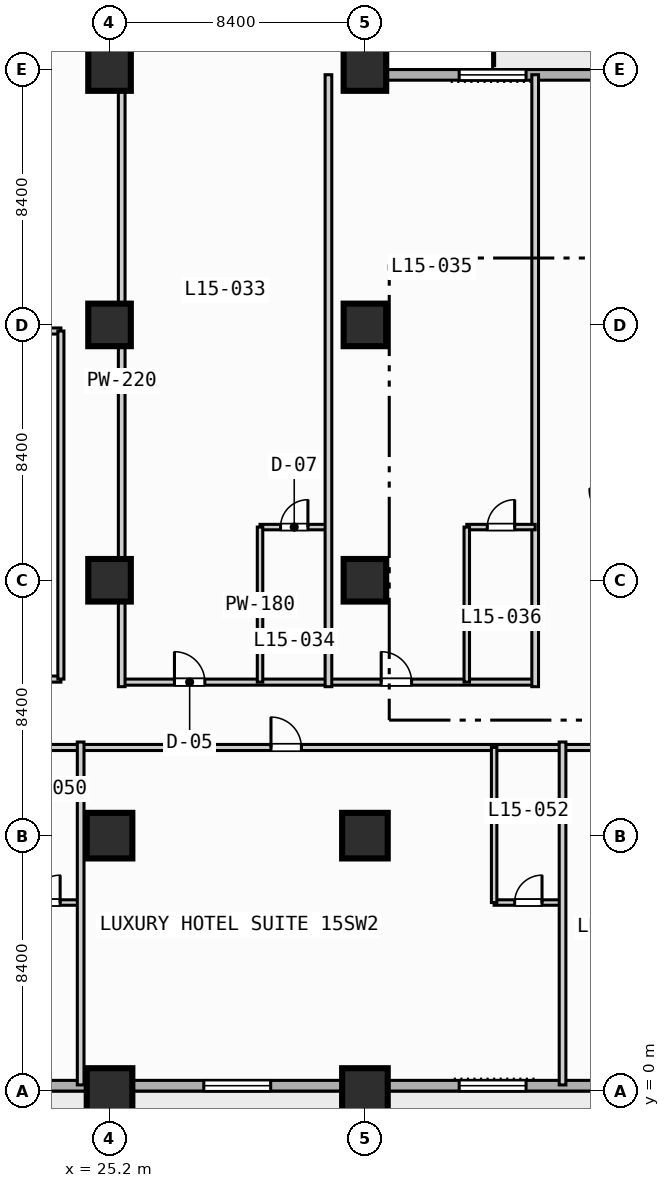
"""IFC4 building model, lengths in metres.
Left out: names, types, materials, properties, quantities, classifications, styles, units other than length and angle.
Written with IfcOpenShell. Run it as: python <this file> out.ifc"""

import sys

from ifc_helpers import new_model, si_unit, direction, frame, frame_2d, origin, origin_2d, place, context, subcontext, project, spatial, rectangle, extrude, element, fill, save


model = new_model("IFC4")
c1 = context("Model", 3, precision=1e-05, world=origin(), true_north=direction((0.0, 1.0)))
c2 = subcontext(c1, "Body", "Model", "MODEL_VIEW")
j1 = project(units=[si_unit("LENGTHUNIT", "METRE"), si_unit("PLANEANGLEUNIT", "RADIAN")], contexts=[c1])
p1 = place(None, origin())
s1 = spatial("IfcSite", under=j1, at=p1, CompositionType="ELEMENT")
p2 = place(p1, origin())
s2 = spatial("IfcBuilding", under=s1, at=p2, CompositionType="ELEMENT")
p3 = place(p2, frame((0.0, 0.0, 66.2)))
s3 = spatial("IfcBuildingStorey", under=s2, at=p3, CompositionType="ELEMENT", Elevation=66.2)
for number, where, z_axis, x_axis in (
    (1, (25.2, 0.0, 0.0), (0.0, 0.0, 1.0), (1.0, 0.0, 0.0)),
    (2, (25.2, 8.4, 0.0), (0.0, 0.0, 1.0), (1.0, 0.0, 0.0)),
):
    element("IfcColumn", number, at=place(p3, frame(where, z_axis=z_axis, x_axis=x_axis)), inside=s3, PredefinedType="COLUMN", context=c2, shape_type="SweptSolid", body=[
        extrude(rectangle(XDim=1.5, YDim=1.5, at=origin_2d()), origin(), (0.0, 0.0, 1.0), 3.8),
    ])
for number, where, z_axis, x_axis in (
    (3, (25.2, 16.8, 0.0), (0.0, 0.0, 1.0), (1.0, 0.0, 0.0)),
    (4, (25.2, 25.2, 0.0), (0.0, 0.0, 1.0), (1.0, 0.0, 0.0)),
    (5, (25.2, 33.6, 0.0), (0.0, 0.0, 1.0), (1.0, 0.0, 0.0)),
):
    element("IfcColumn", number, at=place(p3, frame(where, z_axis=z_axis, x_axis=x_axis)), inside=s3, PredefinedType="COLUMN", context=c2, shape_type="SweptSolid", body=[
        extrude(rectangle(XDim=1.4, YDim=1.4, at=origin_2d()), origin(), (0.0, 0.0, 1.0), 3.8),
    ])
for number, where, z_axis, x_axis in (
    (6, (33.6, 0.0, 0.0), (0.0, 0.0, 1.0), (1.0, 0.0, 0.0)),
    (7, (33.6, 8.4, 0.0), (0.0, 0.0, 1.0), (1.0, 0.0, 0.0)),
):
    element("IfcColumn", number, at=place(p3, frame(where, z_axis=z_axis, x_axis=x_axis)), inside=s3, PredefinedType="COLUMN", context=c2, shape_type="SweptSolid", body=[
        extrude(rectangle(XDim=1.5, YDim=1.5, at=origin_2d()), origin(), (0.0, 0.0, 1.0), 3.8),
    ])
for number, where, z_axis, x_axis in (
    (8, (33.6, 16.8, 0.0), (0.0, 0.0, 1.0), (1.0, 0.0, 0.0)),
    (9, (33.6, 25.2, 0.0), (0.0, 0.0, 1.0), (1.0, 0.0, 0.0)),
    (10, (33.6, 33.6, 0.0), (0.0, 0.0, 1.0), (1.0, 0.0, 0.0)),
):
    element("IfcColumn", number, at=place(p3, frame(where, z_axis=z_axis, x_axis=x_axis)), inside=s3, PredefinedType="COLUMN", context=c2, shape_type="SweptSolid", body=[
        extrude(rectangle(XDim=1.4, YDim=1.4, at=origin_2d()), origin(), (0.0, 0.0, 1.0), 3.8),
    ])
p4 = place(p3, frame((33.425, 89.225, 0.0), z_axis=(0.0, 0.0, 1.0), x_axis=(0.0, -1.0, 0.0)))
e11 = element("IfcWall", 11, at=p4, inside=s3, PredefinedType="STANDARD", context=c2, shape_type="SweptSolid", body=[
    extrude(rectangle(XDim=55.8, YDim=0.35, at=frame_2d((27.9, 0.0))), origin(), (0.0, 0.0, 1.0), 3.55),
])
p5 = place(p4, frame((16.725, 0.0, 0.85)))
e12 = element("IfcOpeningElement", 12, at=p5, cuts=e11, PredefinedType="OPENING", context=c2, shape_type="SweptSolid", body=[
    extrude(rectangle(XDim=2.2, YDim=1.8, at=frame_2d((1.1, 0.9))), frame((0.0, 0.185, 0.0), z_axis=(0.0, -1.0, 0.0), x_axis=(1.0, 0.0, 0.0)), (0.0, 0.0, 1.0), 0.37),
])
p6 = place(p4, frame((8.325, 0.0, 0.85)))
e13 = element("IfcOpeningElement", 13, at=p6, cuts=e11, PredefinedType="OPENING", context=c2, shape_type="SweptSolid", body=[
    extrude(rectangle(XDim=2.2, YDim=1.8, at=frame_2d((1.1, 0.9))), frame((0.0, 0.185, 0.0), z_axis=(0.0, -1.0, 0.0), x_axis=(1.0, 0.0, 0.0)), (0.0, 0.0, 1.0), 0.37),
])
p7 = place(p3, frame((33.425, 33.425, 0.0), z_axis=(0.0, 0.0, 1.0), x_axis=(1.0, 0.0, 0.0)))
e14 = element("IfcWall", 14, at=p7, inside=s3, PredefinedType="STANDARD", context=c2, shape_type="SweptSolid", body=[
    extrude(rectangle(XDim=55.8, YDim=0.35, at=frame_2d((27.9, 0.0))), origin(), (0.0, 0.0, 1.0), 3.55),
])
p8 = place(p7, frame((12.075, 0.0, 0.0)))
e15 = element("IfcOpeningElement", 15, at=p8, cuts=e14, PredefinedType="OPENING", context=c2, shape_type="SweptSolid", body=[
    extrude(rectangle(XDim=1.4, YDim=2.2, at=frame_2d((0.7, 1.1))), frame((0.0, 0.185, 0.0), z_axis=(0.0, -1.0, 0.0), x_axis=(1.0, 0.0, 0.0)), (0.0, 0.0, 1.0), 0.37),
])
p9 = place(p7, frame((3.275, 0.0, 0.85)))
e16 = element("IfcOpeningElement", 16, at=p9, cuts=e14, PredefinedType="OPENING", context=c2, shape_type="SweptSolid", body=[
    extrude(rectangle(XDim=2.2, YDim=1.8, at=frame_2d((1.1, 0.9))), frame((0.0, 0.185, 0.0), z_axis=(0.0, -1.0, 0.0), x_axis=(1.0, 0.0, 0.0)), (0.0, 0.0, 1.0), 0.37),
])
p10 = place(p7, frame((36.875, 0.0, 0.85)))
e17 = element("IfcOpeningElement", 17, at=p10, cuts=e14, PredefinedType="OPENING", context=c2, shape_type="SweptSolid", body=[
    extrude(rectangle(XDim=2.2, YDim=1.8, at=frame_2d((1.1, 0.9))), frame((0.0, 0.185, 0.0), z_axis=(0.0, -1.0, 0.0), x_axis=(1.0, 0.0, 0.0)), (0.0, 0.0, 1.0), 0.37),
])
p11 = place(p7, frame((45.275, 0.0, 0.85)))
e18 = element("IfcOpeningElement", 18, at=p11, cuts=e14, PredefinedType="OPENING", context=c2, shape_type="SweptSolid", body=[
    extrude(rectangle(XDim=2.2, YDim=1.8, at=frame_2d((1.1, 0.9))), frame((0.0, 0.185, 0.0), z_axis=(0.0, -1.0, 0.0), x_axis=(1.0, 0.0, 0.0)), (0.0, 0.0, 1.0), 0.37),
])
p12 = place(p3, frame((89.225, 0.175, 0.0), z_axis=(0.0, 0.0, 1.0), x_axis=(-1.0, 0.0, 0.0)))
e19 = element("IfcWall", 19, at=p12, inside=s3, PredefinedType="STANDARD", context=c2, shape_type="SweptSolid", body=[
    extrude(rectangle(XDim=86.05, YDim=0.35, at=frame_2d((43.025, 0.0))), origin(), (0.0, 0.0, 1.0), 3.55),
])
p13 = place(p12, frame((67.525, 0.0, 0.0)))
e20 = element("IfcOpeningElement", 20, at=p13, cuts=e19, PredefinedType="OPENING", context=c2, shape_type="SweptSolid", body=[
    extrude(rectangle(XDim=1.4, YDim=2.2, at=frame_2d((0.7, 1.1))), frame((0.0, 0.185, 0.0), z_axis=(0.0, -1.0, 0.0), x_axis=(1.0, 0.0, 0.0)), (0.0, 0.0, 1.0), 0.37),
])
p14 = place(p12, frame((58.725, 0.0, 0.85)))
e21 = element("IfcOpeningElement", 21, at=p14, cuts=e19, PredefinedType="OPENING", context=c2, shape_type="SweptSolid", body=[
    extrude(rectangle(XDim=2.2, YDim=1.8, at=frame_2d((1.1, 0.9))), frame((0.0, 0.185, 0.0), z_axis=(0.0, -1.0, 0.0), x_axis=(1.0, 0.0, 0.0)), (0.0, 0.0, 1.0), 0.37),
])
p15 = place(p12, frame((50.325, 0.0, 0.85)))
e22 = element("IfcOpeningElement", 22, at=p15, cuts=e19, PredefinedType="OPENING", context=c2, shape_type="SweptSolid", body=[
    extrude(rectangle(XDim=2.2, YDim=1.8, at=frame_2d((1.1, 0.9))), frame((0.0, 0.185, 0.0), z_axis=(0.0, -1.0, 0.0), x_axis=(1.0, 0.0, 0.0)), (0.0, 0.0, 1.0), 0.37),
])
p16 = place(p12, frame((41.925, 0.0, 0.85)))
e23 = element("IfcOpeningElement", 23, at=p16, cuts=e19, PredefinedType="OPENING", context=c2, shape_type="SweptSolid", body=[
    extrude(rectangle(XDim=2.2, YDim=1.8, at=frame_2d((1.1, 0.9))), frame((0.0, 0.185, 0.0), z_axis=(0.0, -1.0, 0.0), x_axis=(1.0, 0.0, 0.0)), (0.0, 0.0, 1.0), 0.37),
])
p17 = place(p12, frame((27.675, 0.0, 0.85)))
e24 = element("IfcOpeningElement", 24, at=p17, cuts=e19, PredefinedType="OPENING", context=c2, shape_type="SweptSolid", body=[
    extrude(rectangle(XDim=1.8, YDim=1.8, at=frame_2d((0.9, 0.9))), frame((0.0, 0.185, 0.0), z_axis=(0.0, -1.0, 0.0), x_axis=(1.0, 0.0, 0.0)), (0.0, 0.0, 1.0), 0.37),
])
p18 = place(p3, frame((13.7, 13.55, 0.0), z_axis=(0.0, 0.0, 1.0), x_axis=(1.0, 0.0, 0.0)))
e25 = element("IfcWall", 25, at=p18, inside=s3, PredefinedType="PARTITIONING", context=c2, shape_type="SweptSolid", body=[
    extrude(rectangle(XDim=9.9, YDim=0.2, at=frame_2d((4.95, 0.0))), origin(), (0.0, 0.0, 1.0), 3.55),
])
p19 = place(p18, frame((1.2, 0.0, 0.0)))
e26 = element("IfcOpeningElement", 26, at=p19, cuts=e25, PredefinedType="OPENING", context=c2, shape_type="SweptSolid", body=[
    extrude(rectangle(XDim=0.92, YDim=2.1, at=frame_2d((0.46, 1.05))), frame((0.0, 0.11, 0.0), z_axis=(0.0, -1.0, 0.0), x_axis=(1.0, 0.0, 0.0)), (0.0, 0.0, 1.0), 0.22),
])
p20 = place(p18, frame((6.4, 0.0, 0.0)))
e27 = element("IfcOpeningElement", 27, at=p20, cuts=e25, PredefinedType="OPENING", context=c2, shape_type="SweptSolid", body=[
    extrude(rectangle(XDim=0.92, YDim=2.1, at=frame_2d((0.46, 1.05))), frame((0.0, 0.11, 0.0), z_axis=(0.0, -1.0, 0.0), x_axis=(1.0, 0.0, 0.0)), (0.0, 0.0, 1.0), 0.22),
])
p21 = place(p3, frame((13.7, 25.0, 0.0), z_axis=(0.0, 0.0, 1.0), x_axis=(1.0, 0.0, 0.0)))
e28 = element("IfcWall", 28, at=p21, inside=s3, PredefinedType="PARTITIONING", context=c2, shape_type="SweptSolid", body=[
    extrude(rectangle(XDim=9.9, YDim=0.2, at=frame_2d((4.95, 0.0))), origin(), (0.0, 0.0, 1.0), 2.8),
])
p22 = place(p3, frame((23.6, 13.55, 0.0), z_axis=(0.0, 0.0, 1.0), x_axis=(0.0, 1.0, 0.0)))
e29 = element("IfcWall", 29, at=p22, inside=s3, PredefinedType="PARTITIONING", context=c2, shape_type="SweptSolid", body=[
    extrude(rectangle(XDim=11.45, YDim=0.2, at=frame_2d((5.725, 0.0))), origin(), (0.0, 0.0, 1.0), 3.55),
])
p23 = place(p3, frame((25.6, 13.45, 0.0), z_axis=(0.0, 0.0, 1.0), x_axis=(1.0, 0.0, 0.0)))
e30 = element("IfcWall", 30, at=p23, inside=s3, PredefinedType="PARTITIONING", context=c2, shape_type="SweptSolid", body=[
    extrude(rectangle(XDim=13.6, YDim=0.2, at=frame_2d((6.8, 0.0))), origin(), (0.0, 0.0, 1.0), 3.55),
])
p24 = place(p23, frame((1.735, 0.0, 0.0)))
e31 = element("IfcOpeningElement", 31, at=p24, cuts=e30, PredefinedType="OPENING", context=c2, shape_type="SweptSolid", body=[
    extrude(rectangle(XDim=1.0, YDim=2.15, at=frame_2d((0.5, 1.075))), frame((0.0, 0.11, 0.0), z_axis=(0.0, -1.0, 0.0), x_axis=(1.0, 0.0, 0.0)), (0.0, 0.0, 1.0), 0.22),
])
p25 = place(p23, frame((8.535, 0.0, 0.0)))
e32 = element("IfcOpeningElement", 32, at=p25, cuts=e30, PredefinedType="OPENING", context=c2, shape_type="SweptSolid", body=[
    extrude(rectangle(XDim=1.0, YDim=2.15, at=frame_2d((0.5, 1.075))), frame((0.0, 0.11, 0.0), z_axis=(0.0, -1.0, 0.0), x_axis=(1.0, 0.0, 0.0)), (0.0, 0.0, 1.0), 0.22),
])
p26 = place(p3, frame((25.6, 13.3, 0.0), z_axis=(0.0, 0.0, 1.0), x_axis=(0.0, 1.0, 0.0)))
e33 = element("IfcWall", 33, at=p26, inside=s3, PredefinedType="PARTITIONING", context=c2, shape_type="SweptSolid", body=[
    extrude(rectangle(XDim=20.13, YDim=0.22, at=frame_2d((10.065, 0.0))), origin(), (0.0, 0.0, 1.0), 3.55),
])
p27 = place(p3, frame((30.15, 18.55, 0.0), z_axis=(0.0, 0.0, 1.0), x_axis=(1.0, 0.0, 0.0)))
e34 = element("IfcWall", 34, at=p27, inside=s3, PredefinedType="PLUMBINGWALL", context=c2, shape_type="SweptSolid", body=[
    extrude(rectangle(XDim=2.25, YDim=0.18, at=frame_2d((1.125, 0.0))), origin(), (0.0, 0.0, 1.0), 3.55),
])
p28 = place(p27, frame((0.675, 0.0, 0.0)))
e35 = element("IfcOpeningElement", 35, at=p28, cuts=e34, PredefinedType="OPENING", context=c2, shape_type="SweptSolid", body=[
    extrude(rectangle(XDim=0.9, YDim=2.1, at=frame_2d((0.45, 1.05))), frame((0.0, 0.1, 0.0), z_axis=(0.0, -1.0, 0.0), x_axis=(1.0, 0.0, 0.0)), (0.0, 0.0, 1.0), 0.2),
])
p29 = place(p3, frame((30.15, 13.45, 0.0), z_axis=(0.0, 0.0, 1.0), x_axis=(0.0, 1.0, 0.0)))
e36 = element("IfcWall", 36, at=p29, inside=s3, PredefinedType="PLUMBINGWALL", context=c2, shape_type="SweptSolid", body=[
    extrude(rectangle(XDim=5.1, YDim=0.18, at=frame_2d((2.55, 0.0))), origin(), (0.0, 0.0, 1.0), 3.55),
])
for number, where, z_axis, x_axis in (
    (37, (32.4, 13.3, 0.0), (0.0, 0.0, 1.0), (0.0, 1.0, 0.0)),
    (38, (39.2, 13.3, 0.0), (0.0, 0.0, 1.0), (0.0, 1.0, 0.0)),
):
    element("IfcWall", number, at=place(p3, frame(where, z_axis=z_axis, x_axis=x_axis)), inside=s3, PredefinedType="PARTITIONING", context=c2, shape_type="SweptSolid", body=[
        extrude(rectangle(XDim=20.13, YDim=0.22, at=frame_2d((10.065, 0.0))), origin(), (0.0, 0.0, 1.0), 3.55),
    ])
p30 = place(p3, frame((36.95, 18.55, 0.0), z_axis=(0.0, 0.0, 1.0), x_axis=(1.0, 0.0, 0.0)))
e39 = element("IfcWall", 39, at=p30, inside=s3, PredefinedType="PLUMBINGWALL", context=c2, shape_type="SweptSolid", body=[
    extrude(rectangle(XDim=2.25, YDim=0.18, at=frame_2d((1.125, 0.0))), origin(), (0.0, 0.0, 1.0), 3.55),
])
p31 = place(p30, frame((0.675, 0.0, 0.0)))
e40 = element("IfcOpeningElement", 40, at=p31, cuts=e39, PredefinedType="OPENING", context=c2, shape_type="SweptSolid", body=[
    extrude(rectangle(XDim=0.9, YDim=2.1, at=frame_2d((0.45, 1.05))), frame((0.0, 0.1, 0.0), z_axis=(0.0, -1.0, 0.0), x_axis=(1.0, 0.0, 0.0)), (0.0, 0.0, 1.0), 0.2),
])
p32 = place(p3, frame((36.95, 13.45, 0.0), z_axis=(0.0, 0.0, 1.0), x_axis=(0.0, 1.0, 0.0)))
e41 = element("IfcWall", 41, at=p32, inside=s3, PredefinedType="PLUMBINGWALL", context=c2, shape_type="SweptSolid", body=[
    extrude(rectangle(XDim=5.1, YDim=0.18, at=frame_2d((2.55, 0.0))), origin(), (0.0, 0.0, 1.0), 3.55),
])
p33 = place(p3, frame((13.7, 11.3, 0.0), z_axis=(0.0, 0.0, 1.0), x_axis=(1.0, 0.0, 0.0)))
e42 = element("IfcWall", 42, at=p33, inside=s3, PredefinedType="PARTITIONING", context=c2, shape_type="SweptSolid", body=[
    extrude(rectangle(XDim=50.1, YDim=0.2, at=frame_2d((25.05, 0.0))), origin(), (0.0, 0.0, 1.0), 3.55),
])
p34 = place(p33, frame((3.61, 0.0, 0.0)))
e43 = element("IfcOpeningElement", 43, at=p34, cuts=e42, PredefinedType="OPENING", context=c2, shape_type="SweptSolid", body=[
    extrude(rectangle(XDim=1.0, YDim=2.15, at=frame_2d((0.5, 1.075))), frame((0.0, 0.11, 0.0), z_axis=(0.0, -1.0, 0.0), x_axis=(1.0, 0.0, 0.0)), (0.0, 0.0, 1.0), 0.22),
])
p35 = place(p33, frame((16.81, 0.0, 0.0)))
e44 = element("IfcOpeningElement", 44, at=p35, cuts=e42, PredefinedType="OPENING", context=c2, shape_type="SweptSolid", body=[
    extrude(rectangle(XDim=1.0, YDim=2.15, at=frame_2d((0.5, 1.075))), frame((0.0, 0.11, 0.0), z_axis=(0.0, -1.0, 0.0), x_axis=(1.0, 0.0, 0.0)), (0.0, 0.0, 1.0), 0.22),
])
p36 = place(p33, frame((31.935, 0.0, 0.0)))
e45 = element("IfcOpeningElement", 45, at=p36, cuts=e42, PredefinedType="OPENING", context=c2, shape_type="SweptSolid", body=[
    extrude(rectangle(XDim=1.0, YDim=2.15, at=frame_2d((0.5, 1.075))), frame((0.0, 0.11, 0.0), z_axis=(0.0, -1.0, 0.0), x_axis=(1.0, 0.0, 0.0)), (0.0, 0.0, 1.0), 0.22),
])
p37 = place(p33, frame((43.785, 0.0, 0.0)))
e46 = element("IfcOpeningElement", 46, at=p37, cuts=e42, PredefinedType="OPENING", context=c2, shape_type="SweptSolid", body=[
    extrude(rectangle(XDim=1.0, YDim=2.15, at=frame_2d((0.5, 1.075))), frame((0.0, 0.11, 0.0), z_axis=(0.0, -1.0, 0.0), x_axis=(1.0, 0.0, 0.0)), (0.0, 0.0, 1.0), 0.22),
])
p38 = place(p3, frame((22.0, 6.2, 0.0), z_axis=(0.0, 0.0, 1.0), x_axis=(1.0, 0.0, 0.0)))
e47 = element("IfcWall", 47, at=p38, inside=s3, PredefinedType="PLUMBINGWALL", context=c2, shape_type="SweptSolid", body=[
    extrude(rectangle(XDim=2.25, YDim=0.18, at=frame_2d((1.125, 0.0))), origin(), (0.0, 0.0, 1.0), 3.55),
])
p39 = place(p38, frame((0.675, 0.0, 0.0)))
e48 = element("IfcOpeningElement", 48, at=p39, cuts=e47, PredefinedType="OPENING", context=c2, shape_type="SweptSolid", body=[
    extrude(rectangle(XDim=0.9, YDim=2.1, at=frame_2d((0.45, 1.05))), frame((0.0, 0.1, 0.0), z_axis=(0.0, -1.0, 0.0), x_axis=(1.0, 0.0, 0.0)), (0.0, 0.0, 1.0), 0.2),
])
p40 = place(p3, frame((24.25, 0.2, 0.0), z_axis=(0.0, 0.0, 1.0), x_axis=(0.0, 1.0, 0.0)))
e49 = element("IfcWall", 49, at=p40, inside=s3, PredefinedType="PARTITIONING", context=c2, shape_type="SweptSolid", body=[
    extrude(rectangle(XDim=11.28, YDim=0.22, at=frame_2d((5.64, 0.0))), origin(), (0.0, 0.0, 1.0), 3.55),
])
p41 = place(p3, frame((37.85, 6.2, 0.0), z_axis=(0.0, 0.0, 1.0), x_axis=(1.0, 0.0, 0.0)))
e50 = element("IfcWall", 50, at=p41, inside=s3, PredefinedType="PLUMBINGWALL", context=c2, shape_type="SweptSolid", body=[
    extrude(rectangle(XDim=2.25, YDim=0.18, at=frame_2d((1.125, 0.0))), origin(), (0.0, 0.0, 1.0), 3.55),
])
p42 = place(p41, frame((0.675, 0.0, 0.0)))
e51 = element("IfcOpeningElement", 51, at=p42, cuts=e50, PredefinedType="OPENING", context=c2, shape_type="SweptSolid", body=[
    extrude(rectangle(XDim=0.9, YDim=2.1, at=frame_2d((0.45, 1.05))), frame((0.0, 0.1, 0.0), z_axis=(0.0, -1.0, 0.0), x_axis=(1.0, 0.0, 0.0)), (0.0, 0.0, 1.0), 0.2),
])
p43 = place(p3, frame((37.85, 6.2, 0.0), z_axis=(0.0, 0.0, 1.0), x_axis=(0.0, 1.0, 0.0)))
e52 = element("IfcWall", 52, at=p43, inside=s3, PredefinedType="PLUMBINGWALL", context=c2, shape_type="SweptSolid", body=[
    extrude(rectangle(XDim=5.1, YDim=0.18, at=frame_2d((2.55, 0.0))), origin(), (0.0, 0.0, 1.0), 3.55),
])
p44 = place(p3, frame((40.1, 0.2, 0.0), z_axis=(0.0, 0.0, 1.0), x_axis=(0.0, 1.0, 0.0)))
e53 = element("IfcWall", 53, at=p44, inside=s3, PredefinedType="PARTITIONING", context=c2, shape_type="SweptSolid", body=[
    extrude(rectangle(XDim=11.28, YDim=0.22, at=frame_2d((5.64, 0.0))), origin(), (0.0, 0.0, 1.0), 3.55),
])
p45 = place(p9, origin())
e54 = element("IfcWindow", 54, at=p45, inside=s3, PartitioningType="SINGLE_PANEL", PredefinedType="WINDOW", context=c2, shape_type="SweptSolid", body=[
    extrude(rectangle(XDim=2.2, YDim=1.8, at=frame_2d((1.1, 0.9))), frame((0.0, 0.03, 0.0), z_axis=(0.0, -1.0, 0.0), x_axis=(1.0, 0.0, 0.0)), (0.0, 0.0, 1.0), 0.06),
])
fill(e16, e54)
p46 = place(p14, origin())
e55 = element("IfcWindow", 55, at=p46, inside=s3, PartitioningType="SINGLE_PANEL", PredefinedType="WINDOW", context=c2, shape_type="SweptSolid", body=[
    extrude(rectangle(XDim=2.2, YDim=1.8, at=frame_2d((1.1, 0.9))), frame((0.0, 0.03, 0.0), z_axis=(0.0, -1.0, 0.0), x_axis=(1.0, 0.0, 0.0)), (0.0, 0.0, 1.0), 0.06),
])
fill(e21, e55)
p47 = place(p15, origin())
e56 = element("IfcWindow", 56, at=p47, inside=s3, PartitioningType="SINGLE_PANEL", PredefinedType="WINDOW", context=c2, shape_type="SweptSolid", body=[
    extrude(rectangle(XDim=2.2, YDim=1.8, at=frame_2d((1.1, 0.9))), frame((0.0, 0.03, 0.0), z_axis=(0.0, -1.0, 0.0), x_axis=(1.0, 0.0, 0.0)), (0.0, 0.0, 1.0), 0.06),
])
fill(e22, e56)
p48 = place(p24, origin())
e57 = element("IfcDoor", 57, at=p48, inside=s3, OperationType="SINGLE_SWING_LEFT", PredefinedType="DOOR", context=c2, shape_type="SweptSolid", body=[
    extrude(rectangle(XDim=1.0, YDim=2.15, at=frame_2d((0.5, 1.075))), frame((0.0, 0.025, 0.0), z_axis=(0.0, -1.0, 0.0), x_axis=(1.0, 0.0, 0.0)), (0.0, 0.0, 1.0), 0.05),
])
fill(e31, e57)
p49 = place(p25, origin())
e58 = element("IfcDoor", 58, at=p49, inside=s3, OperationType="SINGLE_SWING_LEFT", PredefinedType="DOOR", context=c2, shape_type="SweptSolid", body=[
    extrude(rectangle(XDim=1.0, YDim=2.15, at=frame_2d((0.5, 1.075))), frame((0.0, 0.025, 0.0), z_axis=(0.0, -1.0, 0.0), x_axis=(1.0, 0.0, 0.0)), (0.0, 0.0, 1.0), 0.05),
])
fill(e32, e58)
p50 = place(p28, origin())
e59 = element("IfcDoor", 59, at=p50, inside=s3, OperationType="SINGLE_SWING_RIGHT", PredefinedType="DOOR", context=c2, shape_type="SweptSolid", body=[
    extrude(rectangle(XDim=0.9, YDim=2.1, at=frame_2d((0.45, 1.05))), frame((0.0, 0.025, 0.0), z_axis=(0.0, -1.0, 0.0), x_axis=(1.0, 0.0, 0.0)), (0.0, 0.0, 1.0), 0.05),
])
fill(e35, e59)
p51 = place(p31, origin())
e60 = element("IfcDoor", 60, at=p51, inside=s3, OperationType="SINGLE_SWING_RIGHT", PredefinedType="DOOR", context=c2, shape_type="SweptSolid", body=[
    extrude(rectangle(XDim=0.9, YDim=2.1, at=frame_2d((0.45, 1.05))), frame((0.0, 0.025, 0.0), z_axis=(0.0, -1.0, 0.0), x_axis=(1.0, 0.0, 0.0)), (0.0, 0.0, 1.0), 0.05),
])
fill(e40, e60)
p52 = place(p35, origin())
e61 = element("IfcDoor", 61, at=p52, inside=s3, OperationType="SINGLE_SWING_LEFT", PredefinedType="DOOR", context=c2, shape_type="SweptSolid", body=[
    extrude(rectangle(XDim=1.0, YDim=2.15, at=frame_2d((0.5, 1.075))), frame((0.0, 0.025, 0.0), z_axis=(0.0, -1.0, 0.0), x_axis=(1.0, 0.0, 0.0)), (0.0, 0.0, 1.0), 0.05),
])
fill(e44, e61)
p53 = place(p39, origin())
e62 = element("IfcDoor", 62, at=p53, inside=s3, OperationType="SINGLE_SWING_RIGHT", PredefinedType="DOOR", context=c2, shape_type="SweptSolid", body=[
    extrude(rectangle(XDim=0.9, YDim=2.1, at=frame_2d((0.45, 1.05))), frame((0.0, 0.025, 0.0), z_axis=(0.0, -1.0, 0.0), x_axis=(1.0, 0.0, 0.0)), (0.0, 0.0, 1.0), 0.05),
])
fill(e48, e62)
p54 = place(p42, origin())
e63 = element("IfcDoor", 63, at=p54, inside=s3, OperationType="SINGLE_SWING_RIGHT", PredefinedType="DOOR", context=c2, shape_type="SweptSolid", body=[
    extrude(rectangle(XDim=0.9, YDim=2.1, at=frame_2d((0.45, 1.05))), frame((0.0, 0.025, 0.0), z_axis=(0.0, -1.0, 0.0), x_axis=(1.0, 0.0, 0.0)), (0.0, 0.0, 1.0), 0.05),
])
fill(e51, e63)
save(model, sys.argv[1])
